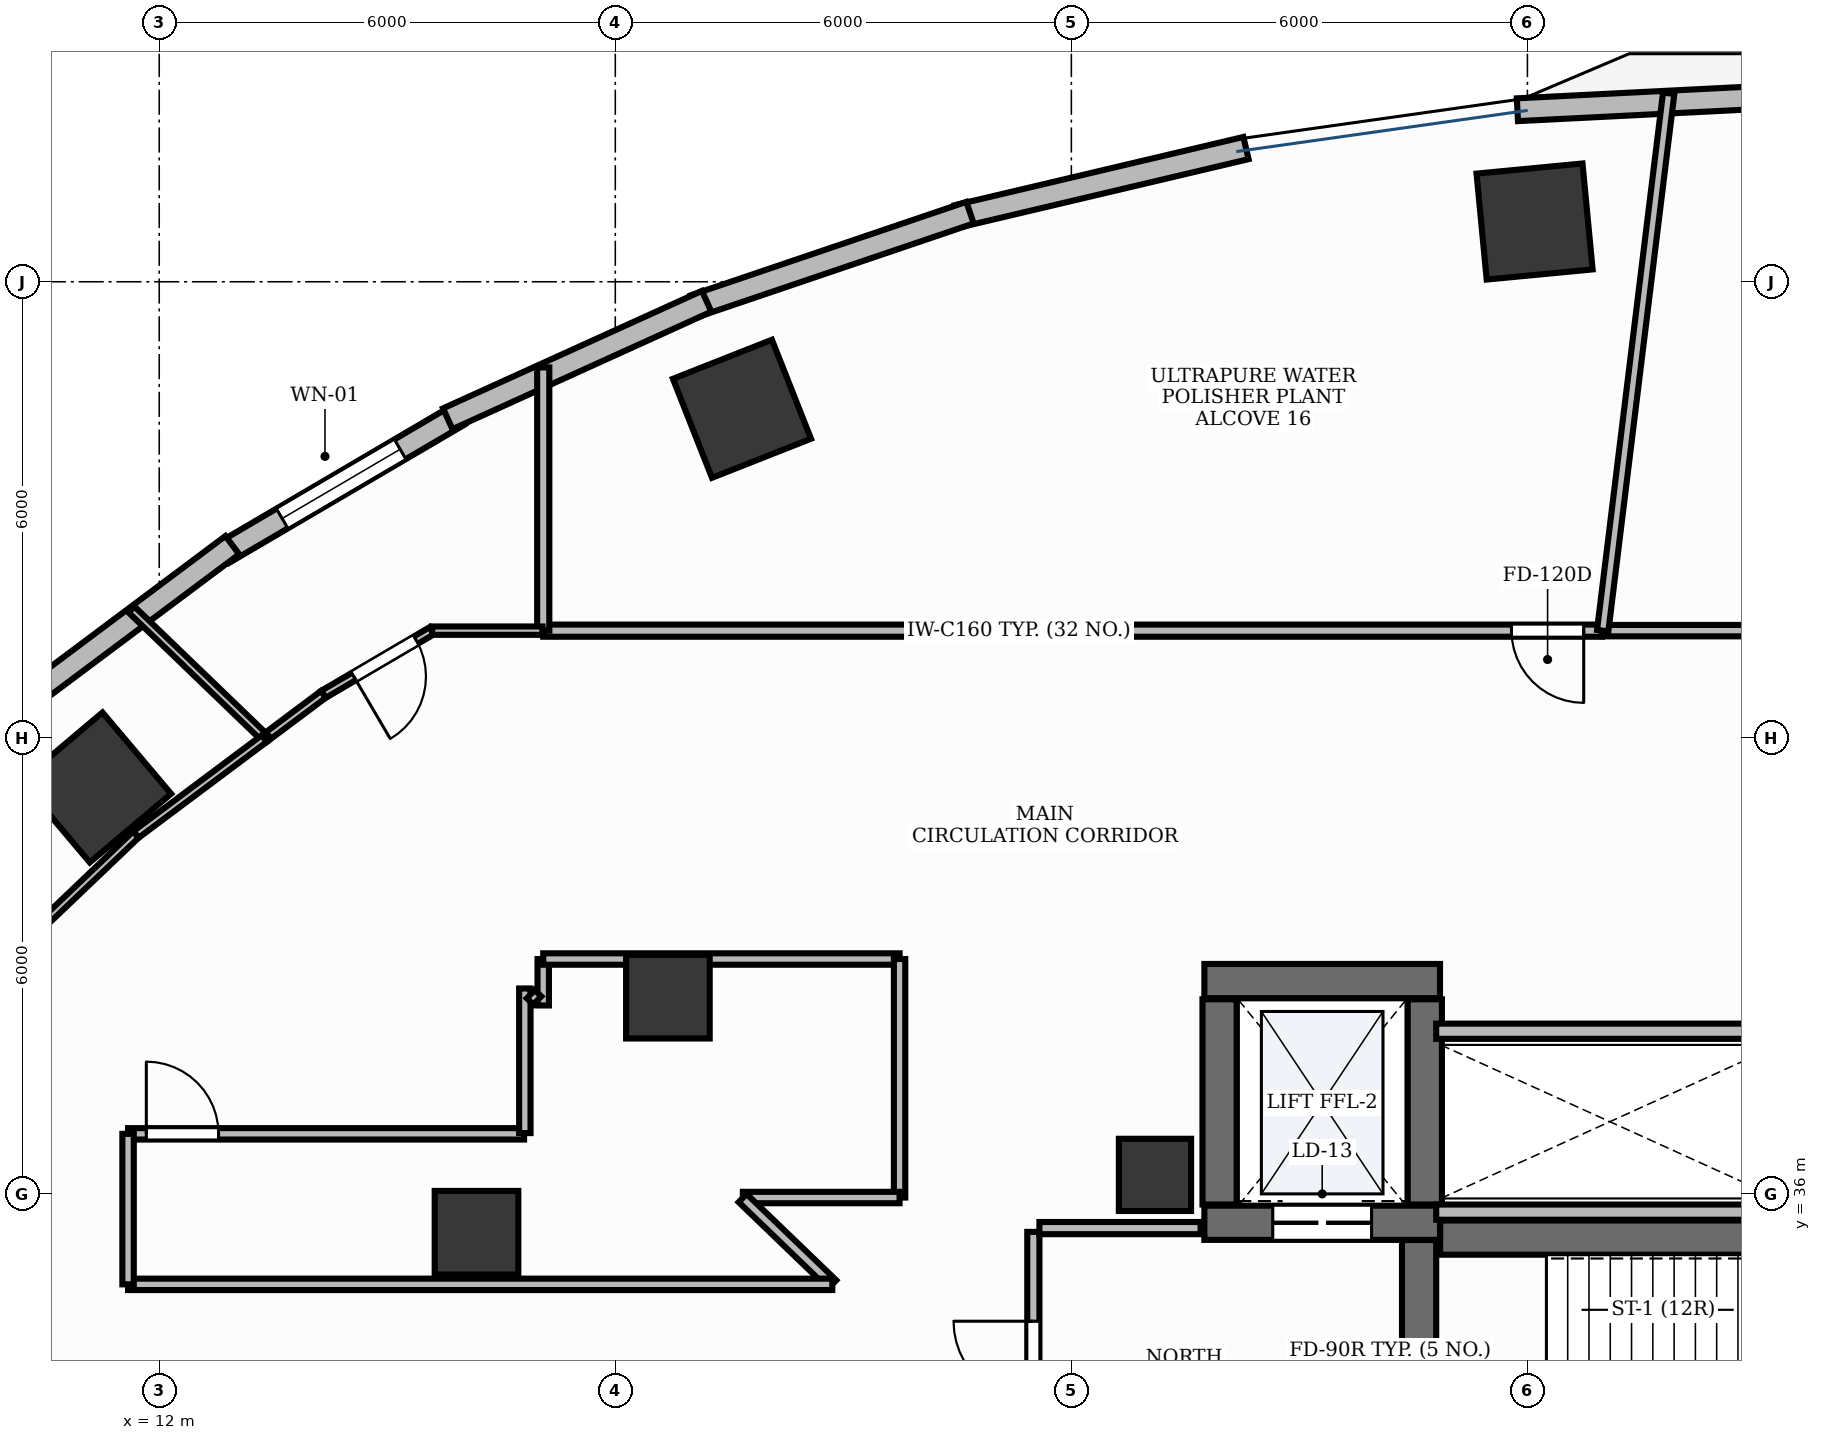
"""IFC4 building model, lengths in metres.
Left out: names, types, materials, properties, quantities, classifications, styles, units other than length and angle.
Written with IfcOpenShell. Run it as: python <this file> out.ifc"""

import sys

from ifc_helpers import new_model, si_unit, direction, frame, frame_2d, origin, origin_2d, place, context, subcontext, project, spatial, rectangle, extrude, element, fill, save


model = new_model("IFC4")
c1 = context("Model", 3, precision=1e-05, world=origin(), true_north=direction((0.0, 1.0)))
c2 = subcontext(c1, "Body", "Model", "MODEL_VIEW")
j1 = project(units=[si_unit("LENGTHUNIT", "METRE"), si_unit("PLANEANGLEUNIT", "RADIAN")], contexts=[c1])
p1 = place(None, origin())
s1 = spatial("IfcSite", under=j1, at=p1, CompositionType="ELEMENT")
p2 = place(p1, origin())
s2 = spatial("IfcBuilding", under=s1, at=p2, CompositionType="ELEMENT")
p3 = place(p2, frame((0.0, 0.0, 59.4)))
s3 = spatial("IfcBuildingStorey", under=s2, at=p3, CompositionType="ELEMENT", Elevation=59.4)
p4 = place(p3, frame((28.852, 35.425, 0.0), z_axis=(0.0, 0.0, 1.0), x_axis=(1.0, 0.0, 0.0)))
e1 = element("IfcWall", 1, at=p4, inside=s3, PredefinedType="SHEAR", context=c2, shape_type="SweptSolid", body=[
    extrude(rectangle(XDim=8.248, YDim=0.45, at=frame_2d((4.124, 0.0))), origin(), (0.0, 0.0, 1.0), 3.9),
])
p5 = place(p3, frame((28.575, 32.11, 0.0), z_axis=(0.0, 0.0, 1.0), x_axis=(0.0, 1.0, 0.0)))
e2 = element("IfcWall", 2, at=p5, inside=s3, PredefinedType="SHEAR", context=c2, shape_type="SweptSolid", body=[
    extrude(rectangle(XDim=3.283, YDim=0.45, at=frame_2d((1.642, 0.0))), origin(), (0.0, 0.0, 1.0), 3.9),
])
p6 = place(p5, frame((0.2, 0.0, 0.0)))
e3 = element("IfcOpeningElement", 3, at=p6, cuts=e2, PredefinedType="OPENING", context=c2, shape_type="SweptSolid", body=[
    extrude(rectangle(XDim=1.05, YDim=2.15, at=frame_2d((0.525, 1.075))), frame((0.0, 0.24, 0.0), z_axis=(0.0, -1.0, 0.0), x_axis=(1.0, 0.0, 0.0)), (0.0, 0.0, 1.0), 0.48),
])
p7 = place(p3, frame((25.75, 38.8, 0.0), z_axis=(0.0, 0.0, 1.0), x_axis=(1.0, 0.0, 0.0)))
e4 = element("IfcWall", 4, at=p7, inside=s3, PredefinedType="SHEAR", context=c2, shape_type="SweptSolid", body=[
    extrude(rectangle(XDim=3.1, YDim=0.45, at=frame_2d((1.55, 0.0))), origin(), (0.0, 0.0, 1.0), 3.9),
])
p8 = place(p3, frame((25.75, 35.62, 0.0), z_axis=(0.0, 0.0, 1.0), x_axis=(1.0, 0.0, 0.0)))
e5 = element("IfcWall", 5, at=p8, inside=s3, PredefinedType="SHEAR", context=c2, shape_type="SweptSolid", body=[
    extrude(rectangle(XDim=3.1, YDim=0.45, at=frame_2d((1.55, 0.0))), origin(), (0.0, 0.0, 1.0), 3.9),
])
p9 = place(p8, frame((0.9, 0.0, 0.0)))
e6 = element("IfcOpeningElement", 6, at=p9, cuts=e5, PredefinedType="OPENING", context=c2, shape_type="SweptSolid", body=[
    extrude(rectangle(XDim=1.3, YDim=2.2, at=frame_2d((0.65, 1.1))), frame((0.0, 0.24, 0.0), z_axis=(0.0, -1.0, 0.0), x_axis=(1.0, 0.0, 0.0)), (0.0, 0.0, 1.0), 0.48),
])
for number, where, z_axis, x_axis in (
    (7, (25.95, 35.86, 0.0), (0.0, 0.0, 1.0), (0.0, 1.0, 0.0)),
    (8, (28.65, 35.86, 0.0), (0.0, 0.0, 1.0), (0.0, 1.0, 0.0)),
):
    element("IfcWall", number, at=place(p3, frame(where, z_axis=z_axis, x_axis=x_axis)), inside=s3, PredefinedType="SHEAR", context=c2, shape_type="SweptSolid", body=[
        extrude(rectangle(XDim=2.7, YDim=0.45, at=frame_2d((1.35, 0.0))), origin(), (0.0, 0.0, 1.0), 3.9),
    ])
p10 = place(p3, frame((25.1, 36.25, -0.0), z_axis=(0.0, 0.0, 1.0), x_axis=(1.0, 0.0, 0.0)))
e9 = element("IfcColumn", 9, at=p10, inside=s3, PredefinedType="PILASTER", context=c2, shape_type="SweptSolid", body=[
    extrude(rectangle(XDim=0.95, YDim=0.95, at=origin_2d()), origin(), (0.0, 0.0, 1.0), 3.901),
])
for number, where, z_axis, x_axis in (
    (10, (30.094, 48.792, -0.0), (0.0, 0.0, 1.0), (0.995, 0.095, 0.0)),
    (11, (19.667, 46.329, -0.0), (0.0, 0.0, 1.0), (0.93, 0.367, 0.0)),
    (12, (11.17, 41.347, -0.0), (0.0, 0.0, 1.0), (0.764, 0.645, 0.0)),
):
    element("IfcColumn", number, at=place(p3, frame(where, z_axis=z_axis, x_axis=x_axis)), inside=s3, PredefinedType="COLUMN", context=c2, shape_type="SweptSolid", body=[
        extrude(rectangle(XDim=1.4, YDim=1.4, at=origin_2d()), origin(), (0.0, 0.0, 1.0), 3.901),
    ])
for number, where, z_axis, x_axis in (
    (13, (18.692, 38.595, -0.0), (0.0, 0.0, 1.0), (1.0, 0.0, 0.0)),
    (14, (16.174, 35.489, -0.0), (0.0, 0.0, 1.0), (1.0, 0.0, 0.0)),
):
    element("IfcColumn", number, at=place(p3, frame(where, z_axis=z_axis, x_axis=x_axis)), inside=s3, PredefinedType="COLUMN", context=c2, shape_type="SweptSolid", body=[
        extrude(rectangle(XDim=1.1, YDim=1.1, at=origin_2d()), origin(), (0.0, 0.0, 1.0), 3.901),
    ])
p11 = place(p3, frame((15.944, 46.25, 0.0), z_axis=(0.0, 0.0, 1.0), x_axis=(-0.862473134325, -0.506102847817, 0.0)))
e15 = element("IfcWall", 15, at=p11, inside=s3, PredefinedType="STANDARD", context=c2, shape_type="SweptSolid", body=[
    extrude(rectangle(XDim=3.595, YDim=0.3, at=frame_2d((1.798, 0.0))), origin(), (0.0, 0.0, 1.0), 3.9),
])
p12 = place(p11, frame((0.898, 0.0, 0.9)))
e16 = element("IfcOpeningElement", 16, at=p12, cuts=e15, PredefinedType="OPENING", context=c2, shape_type="SweptSolid", body=[
    extrude(rectangle(XDim=1.8, YDim=2.1, at=frame_2d((0.9, 1.05))), frame((0.0, 0.165, 0.0), z_axis=(0.0, -1.0, 0.0), x_axis=(1.0, 0.0, 0.0)), (0.0, 0.0, 1.0), 0.33),
])
p13 = place(p3, frame((33.84, 50.463, 0.0), z_axis=(0.0, 0.0, 1.0), x_axis=(-0.998732359232, -0.050335619826, 0.0)))
e17 = element("IfcWall", 17, at=p13, inside=s3, PredefinedType="STANDARD", context=c2, shape_type="SweptSolid", body=[
    extrude(rectangle(XDim=3.977, YDim=0.3, at=frame_2d((1.989, 0.0))), origin(), (0.0, 0.0, 1.0), 3.47),
])
p14 = place(p3, frame((26.297, 49.759, 0.0), z_axis=(0.0, 0.0, 1.0), x_axis=(-0.973197600754, -0.229970497863, 0.0)))
e18 = element("IfcWall", 18, at=p14, inside=s3, PredefinedType="STANDARD", context=c2, shape_type="SweptSolid", body=[
    extrude(rectangle(XDim=3.901, YDim=0.3, at=frame_2d((1.951, 0.0))), origin(), (0.0, 0.0, 1.0), 3.9),
])
p15 = place(p3, frame((22.667, 48.909, 0.0), z_axis=(0.0, 0.0, 1.0), x_axis=(-0.94702579403, -0.321157508773, 0.0)))
e19 = element("IfcWall", 19, at=p15, inside=s3, PredefinedType="STANDARD", context=c2, shape_type="SweptSolid", body=[
    extrude(rectangle(XDim=3.83, YDim=0.3, at=frame_2d((1.915, 0.0))), origin(), (0.0, 0.0, 1.0), 3.9),
])
p16 = place(p3, frame((19.201, 47.743, 0.0), z_axis=(0.0, 0.0, 1.0), x_axis=(-0.910623406862, -0.413237233166, 0.0)))
e20 = element("IfcWall", 20, at=p16, inside=s3, PredefinedType="STANDARD", context=c2, shape_type="SweptSolid", body=[
    extrude(rectangle(XDim=3.74, YDim=0.3, at=frame_2d((1.87, 0.0))), origin(), (0.0, 0.0, 1.0), 3.9),
])
p17 = place(p3, frame((12.961, 44.535, 0.0), z_axis=(0.0, 0.0, 1.0), x_axis=(-0.800823020995, -0.598901067827, 0.0)))
e21 = element("IfcWall", 21, at=p17, inside=s3, PredefinedType="STANDARD", context=c2, shape_type="SweptSolid", body=[
    extrude(rectangle(XDim=3.521, YDim=0.3, at=frame_2d((1.76, 0.0))), origin(), (0.0, 0.0, 1.0), 3.9),
])
for number, where, z_axis, x_axis in (
    (22, (28.8, 35.76, 0.0), (0.0, 0.0, 1.0), (1.0, 0.0, 0.0)),
    (23, (28.8, 38.14, 0.0), (0.0, 0.0, 1.0), (1.0, 0.0, 0.0)),
):
    element("IfcWall", number, at=place(p3, frame(where, z_axis=z_axis, x_axis=x_axis)), inside=s3, PredefinedType="PARTITIONING", context=c2, shape_type="SweptSolid", body=[
        extrude(rectangle(XDim=4.57, YDim=0.2, at=frame_2d((2.285, 0.0))), origin(), (0.0, 0.0, 1.0), 2.91),
    ])
p18 = place(p3, frame((23.5, 32.1, 0.0), z_axis=(0.0, 0.0, 1.0), x_axis=(0.0, 1.0, 0.0)))
e24 = element("IfcWall", 24, at=p18, inside=s3, PredefinedType="PARTITIONING", context=c2, shape_type="SweptSolid", body=[
    extrude(rectangle(XDim=3.4, YDim=0.16, at=frame_2d((1.7, 0.0))), origin(), (0.0, 0.0, 1.0), 2.91),
])
p19 = place(p18, frame((1.175, 0.0, 0.0)))
e25 = element("IfcOpeningElement", 25, at=p19, cuts=e24, PredefinedType="OPENING", context=c2, shape_type="SweptSolid", body=[
    extrude(rectangle(XDim=1.05, YDim=2.15, at=frame_2d((0.525, 1.075))), frame((0.0, 0.095, 0.0), z_axis=(0.0, -1.0, 0.0), x_axis=(1.0, 0.0, 0.0)), (0.0, 0.0, 1.0), 0.19),
])
p20 = place(p3, frame((23.58, 35.55, 0.0), z_axis=(0.0, 0.0, 1.0), x_axis=(1.0, 0.0, 0.0)))
e26 = element("IfcWall", 26, at=p20, inside=s3, PredefinedType="PARTITIONING", context=c2, shape_type="SweptSolid", body=[
    extrude(rectangle(XDim=2.12, YDim=0.16, at=frame_2d((1.06, 0.0))), origin(), (0.0, 0.0, 1.0), 2.91),
])
p21 = place(p3, frame((42.16, 43.41, 0.0), z_axis=(0.0, 0.0, 1.0), x_axis=(-1.0, 0.0, 0.0)))
e27 = element("IfcWall", 27, at=p21, inside=s3, PredefinedType="PARTITIONING", context=c2, shape_type="SweptSolid", body=[
    extrude(rectangle(XDim=11.17, YDim=0.15, at=frame_2d((5.585, 0.0))), origin(), (0.0, 0.0, 1.0), 2.91),
])
p22 = place(p21, frame((6.292, 0.0, 0.0)))
e28 = element("IfcOpeningElement", 28, at=p22, cuts=e27, PredefinedType="OPENING", context=c2, shape_type="SweptSolid", body=[
    extrude(rectangle(XDim=0.95, YDim=2.15, at=frame_2d((0.475, 1.075))), frame((0.0, 0.09, 0.0), z_axis=(0.0, -1.0, 0.0), x_axis=(1.0, 0.0, 0.0)), (0.0, 0.0, 1.0), 0.18),
])
p23 = place(p3, frame((30.98, 43.41, 0.0), z_axis=(0.0, 0.0, 1.0), x_axis=(-1.0, 0.0, 0.0)))
e29 = element("IfcWall", 29, at=p23, inside=s3, PredefinedType="PARTITIONING", context=c2, shape_type="SweptSolid", body=[
    extrude(rectangle(XDim=13.928, YDim=0.16, at=frame_2d((6.964, 0.0))), origin(), (0.0, 0.0, 1.0), 2.91),
])
p24 = place(p23, frame((0.24, 0.0, 0.0)))
e30 = element("IfcOpeningElement", 30, at=p24, cuts=e29, PredefinedType="OPENING", context=c2, shape_type="SweptSolid", body=[
    extrude(rectangle(XDim=0.95, YDim=2.15, at=frame_2d((0.475, 1.075))), frame((0.0, 0.095, 0.0), z_axis=(0.0, -1.0, 0.0), x_axis=(1.0, 0.0, 0.0)), (0.0, 0.0, 1.0), 0.19),
])
p25 = place(p3, frame((15.586, 43.409, 0.0), z_axis=(0.0, 0.0, 1.0), x_axis=(-0.862446636904, -0.506148000582, 0.0)))
e31 = element("IfcWall", 31, at=p25, inside=s3, PredefinedType="MOVABLE", context=c2, shape_type="SweptSolid", body=[
    extrude(rectangle(XDim=1.652, YDim=0.11, at=frame_2d((0.826, 0.0))), origin(), (0.0, 0.0, 1.0), 2.91),
])
p26 = place(p25, frame((0.24, 0.0, 0.0)))
e32 = element("IfcOpeningElement", 32, at=p26, cuts=e31, PredefinedType="OPENING", context=c2, shape_type="SweptSolid", body=[
    extrude(rectangle(XDim=0.95, YDim=2.15, at=frame_2d((0.475, 1.075))), frame((0.0, 0.07, 0.0), z_axis=(0.0, -1.0, 0.0), x_axis=(1.0, 0.0, 0.0)), (0.0, 0.0, 1.0), 0.14),
])
p27 = place(p3, frame((11.59, 36.79, 0.0), z_axis=(0.0, 0.0, 1.0), x_axis=(1.0, 0.0, 0.0)))
e33 = element("IfcWall", 33, at=p27, inside=s3, PredefinedType="PARTITIONING", context=c2, shape_type="SweptSolid", body=[
    extrude(rectangle(XDim=5.21, YDim=0.15, at=frame_2d((2.605, 0.0))), origin(), (0.0, 0.0, 1.0), 2.91),
])
p28 = place(p27, frame((0.24, 0.0, 0.0)))
e34 = element("IfcOpeningElement", 34, at=p28, cuts=e33, PredefinedType="OPENING", context=c2, shape_type="SweptSolid", body=[
    extrude(rectangle(XDim=0.95, YDim=2.15, at=frame_2d((0.475, 1.075))), frame((0.0, 0.09, 0.0), z_axis=(0.0, -1.0, 0.0), x_axis=(1.0, 0.0, 0.0)), (0.0, 0.0, 1.0), 0.18),
])
p29 = place(p3, frame((30.99, 43.41, 0.0), z_axis=(0.0, 0.0, 1.0), x_axis=(0.121849241754, 0.992548619607, 0.0)))
e35 = element("IfcWall", 35, at=p29, inside=s3, PredefinedType="PARTITIONING", context=c2, shape_type="SweptSolid", body=[
    extrude(rectangle(XDim=7.123, YDim=0.15, at=frame_2d((3.562, 0.0))), origin(), (0.0, 0.0, 1.0), 2.91),
])
p30 = place(p3, frame((17.052, 43.41, 0.0), z_axis=(0.0, 0.0, 1.0), x_axis=(0.0, 1.0, 0.0)))
e36 = element("IfcWall", 36, at=p30, inside=s3, PredefinedType="PARTITIONING", context=c2, shape_type="SweptSolid", body=[
    extrude(rectangle(XDim=3.463, YDim=0.16, at=frame_2d((1.731, 0.0))), origin(), (0.0, 0.0, 1.0), 2.91),
])
p31 = place(p3, frame((17.042, 43.41, 0.0), z_axis=(0.0, 0.0, 1.0), x_axis=(-1.0, 0.0, 0.0)))
e37 = element("IfcWall", 37, at=p31, inside=s3, PredefinedType="MOVABLE", context=c2, shape_type="SweptSolid", body=[
    extrude(rectangle(XDim=1.451, YDim=0.11, at=frame_2d((0.726, 0.0))), origin(), (0.0, 0.0, 1.0), 2.91),
])
p32 = place(p3, frame((14.16, 42.572, 0.0), z_axis=(0.0, 0.0, 1.0), x_axis=(-0.800793474552, -0.598940573942, 0.0)))
e38 = element("IfcWall", 38, at=p32, inside=s3, PredefinedType="MOVABLE", context=c2, shape_type="SweptSolid", body=[
    extrude(rectangle(XDim=0.959, YDim=0.11, at=frame_2d((0.479, 0.0))), origin(), (0.0, 0.0, 1.0), 2.91),
])
p33 = place(p3, frame((13.392, 41.997, 0.0), z_axis=(0.0, 0.0, 1.0), x_axis=(-0.720542500503, 0.693410776502, 0.0)))
e39 = element("IfcWall", 39, at=p33, inside=s3, PredefinedType="MOVABLE", context=c2, shape_type="SweptSolid", body=[
    extrude(rectangle(XDim=2.438, YDim=0.11, at=frame_2d((1.219, 0.0))), origin(), (0.0, 0.0, 1.0), 2.91),
])
p34 = place(p3, frame((17.052, 38.479, 0.0), z_axis=(0.0, 0.0, 1.0), x_axis=(0.0, 1.0, 0.0)))
e40 = element("IfcWall", 40, at=p34, inside=s3, PredefinedType="PARTITIONING", context=c2, shape_type="SweptSolid", body=[
    extrude(rectangle(XDim=0.611, YDim=0.15, at=frame_2d((0.306, 0.0))), origin(), (0.0, 0.0, 1.0), 2.91),
])
p35 = place(p3, frame((17.052, 39.09, 0.0), z_axis=(0.0, 0.0, 1.0), x_axis=(1.0, 0.0, 0.0)))
e41 = element("IfcWall", 41, at=p35, inside=s3, PredefinedType="PARTITIONING", context=c2, shape_type="SweptSolid", body=[
    extrude(rectangle(XDim=4.688, YDim=0.15, at=frame_2d((2.344, 0.0))), origin(), (0.0, 0.0, 1.0), 2.91),
])
p36 = place(p3, frame((21.74, 39.09, 0.0), z_axis=(0.0, 0.0, 1.0), x_axis=(0.0, -1.0, 0.0)))
e42 = element("IfcWall", 42, at=p36, inside=s3, PredefinedType="PARTITIONING", context=c2, shape_type="SweptSolid", body=[
    extrude(rectangle(XDim=3.138, YDim=0.15, at=frame_2d((1.569, 0.0))), origin(), (0.0, 0.0, 1.0), 2.91),
])
p37 = place(p3, frame((21.74, 35.952, 0.0), z_axis=(0.0, 0.0, 1.0), x_axis=(-1.0, 0.0, 0.0)))
e43 = element("IfcWall", 43, at=p37, inside=s3, PredefinedType="PARTITIONING", context=c2, shape_type="SweptSolid", body=[
    extrude(rectangle(XDim=2.062, YDim=0.15, at=frame_2d((1.031, 0.0))), origin(), (0.0, 0.0, 1.0), 2.91),
])
p38 = place(p3, frame((19.675, 35.945, 0.0), z_axis=(0.0, 0.0, 1.0), x_axis=(0.720620963524, -0.693329234152, 0.0)))
e44 = element("IfcWall", 44, at=p38, inside=s3, PredefinedType="PARTITIONING", context=c2, shape_type="SweptSolid", body=[
    extrude(rectangle(XDim=1.637, YDim=0.15, at=frame_2d((0.818, 0.0))), origin(), (0.0, 0.0, 1.0), 2.91),
])
p39 = place(p3, frame((20.855, 34.81, 0.0), z_axis=(0.0, 0.0, 1.0), x_axis=(-1.0, 0.0, 0.0)))
e45 = element("IfcWall", 45, at=p39, inside=s3, PredefinedType="PARTITIONING", context=c2, shape_type="SweptSolid", body=[
    extrude(rectangle(XDim=9.265, YDim=0.15, at=frame_2d((4.632, 0.0))), origin(), (0.0, 0.0, 1.0), 2.91),
])
p40 = place(p3, frame((11.59, 34.81, 0.0), z_axis=(0.0, 0.0, 1.0), x_axis=(0.0, 1.0, 0.0)))
e46 = element("IfcWall", 46, at=p40, inside=s3, PredefinedType="PARTITIONING", context=c2, shape_type="SweptSolid", body=[
    extrude(rectangle(XDim=1.98, YDim=0.15, at=frame_2d((0.99, 0.0))), origin(), (0.0, 0.0, 1.0), 2.91),
])
p41 = place(p3, frame((16.81, 36.8, 0.0), z_axis=(0.0, 0.0, 1.0), x_axis=(0.0, 1.0, 0.0)))
e47 = element("IfcWall", 47, at=p41, inside=s3, PredefinedType="PARTITIONING", context=c2, shape_type="SweptSolid", body=[
    extrude(rectangle(XDim=1.902, YDim=0.15, at=frame_2d((0.951, 0.0))), origin(), (0.0, 0.0, 1.0), 2.91),
])
p42 = place(p3, frame((16.888, 38.627, 0.0), z_axis=(0.0, 0.0, 1.0), x_axis=(0.721264817237, -0.692659413721, 0.0)))
e48 = element("IfcWall", 48, at=p42, inside=s3, PredefinedType="PARTITIONING", context=c2, shape_type="SweptSolid", body=[
    extrude(rectangle(XDim=0.119, YDim=0.15, at=frame_2d((0.06, 0.0))), origin(), (0.0, 0.0, 1.0), 2.91),
])
p43 = place(p3, frame((13.384, 41.991, 0.0), z_axis=(0.0, 0.0, 1.0), x_axis=(-0.800776961214, -0.598962651914, 0.0)))
e49 = element("IfcWall", 49, at=p43, inside=s3, PredefinedType="MOVABLE", context=c2, shape_type="SweptSolid", body=[
    extrude(rectangle(XDim=2.11, YDim=0.11, at=frame_2d((1.055, 0.0))), origin(), (0.0, 0.0, 1.0), 2.91),
])
p44 = place(p3, frame((11.693, 40.727, 0.0), z_axis=(0.0, 0.0, 1.0), x_axis=(-0.723683526017, -0.690131983154, 0.0)))
e50 = element("IfcWall", 50, at=p44, inside=s3, PredefinedType="MOVABLE", context=c2, shape_type="SweptSolid", body=[
    extrude(rectangle(XDim=2.94, YDim=0.11, at=frame_2d((1.47, 0.0))), origin(), (0.0, 0.0, 1.0), 2.91),
])
p45 = place(p12, origin())
e51 = element("IfcWindow", 51, at=p45, inside=s3, PartitioningType="SINGLE_PANEL", PredefinedType="WINDOW", context=c2, shape_type="SweptSolid", body=[
    extrude(rectangle(XDim=1.8, YDim=2.1, at=frame_2d((0.9, 1.05))), frame((0.0, 0.03, 0.0), z_axis=(0.0, -1.0, 0.0), x_axis=(1.0, 0.0, 0.0)), (0.0, 0.0, 1.0), 0.06),
])
fill(e16, e51)
p46 = place(p9, origin())
e52 = element("IfcDoor", 52, at=p46, inside=s3, OperationType="DOUBLE_DOOR_SLIDING", PredefinedType="DOOR", context=c2, shape_type="SweptSolid", body=[
    extrude(rectangle(XDim=1.3, YDim=2.2, at=frame_2d((0.65, 1.1))), frame((0.0, 0.025, 0.0), z_axis=(0.0, -1.0, 0.0), x_axis=(1.0, 0.0, 0.0)), (0.0, 0.0, 1.0), 0.05),
])
fill(e6, e52)
p47 = place(p19, origin())
e53 = element("IfcDoor", 53, at=p47, inside=s3, OperationType="SINGLE_SWING_RIGHT", PredefinedType="DOOR", context=c2, shape_type="SweptSolid", body=[
    extrude(rectangle(XDim=1.05, YDim=2.15, at=frame_2d((0.525, 1.075))), frame((0.0, 0.025, 0.0), z_axis=(0.0, -1.0, 0.0), x_axis=(1.0, 0.0, 0.0)), (0.0, 0.0, 1.0), 0.05),
])
fill(e25, e53)
p48 = place(p24, origin())
e54 = element("IfcDoor", 54, at=p48, inside=s3, OperationType="SINGLE_SWING_LEFT", PredefinedType="DOOR", context=c2, shape_type="SweptSolid", body=[
    extrude(rectangle(XDim=0.95, YDim=2.15, at=frame_2d((0.475, 1.075))), frame((0.0, 0.025, 0.0), z_axis=(0.0, -1.0, 0.0), x_axis=(1.0, 0.0, 0.0)), (0.0, 0.0, 1.0), 0.05),
])
fill(e30, e54)
p49 = place(p26, origin())
e55 = element("IfcDoor", 55, at=p49, inside=s3, OperationType="SINGLE_SWING_RIGHT", PredefinedType="DOOR", context=c2, shape_type="SweptSolid", body=[
    extrude(rectangle(XDim=0.95, YDim=2.15, at=frame_2d((0.475, 1.075))), frame((0.0, 0.025, 0.0), z_axis=(0.0, -1.0, 0.0), x_axis=(1.0, 0.0, 0.0)), (0.0, 0.0, 1.0), 0.05),
])
fill(e32, e55)
p50 = place(p28, origin())
e56 = element("IfcDoor", 56, at=p50, inside=s3, OperationType="SINGLE_SWING_LEFT", PredefinedType="DOOR", context=c2, shape_type="SweptSolid", body=[
    extrude(rectangle(XDim=0.95, YDim=2.15, at=frame_2d((0.475, 1.075))), frame((0.0, 0.025, 0.0), z_axis=(0.0, -1.0, 0.0), x_axis=(1.0, 0.0, 0.0)), (0.0, 0.0, 1.0), 0.05),
])
fill(e34, e56)
save(model, sys.argv[1])
